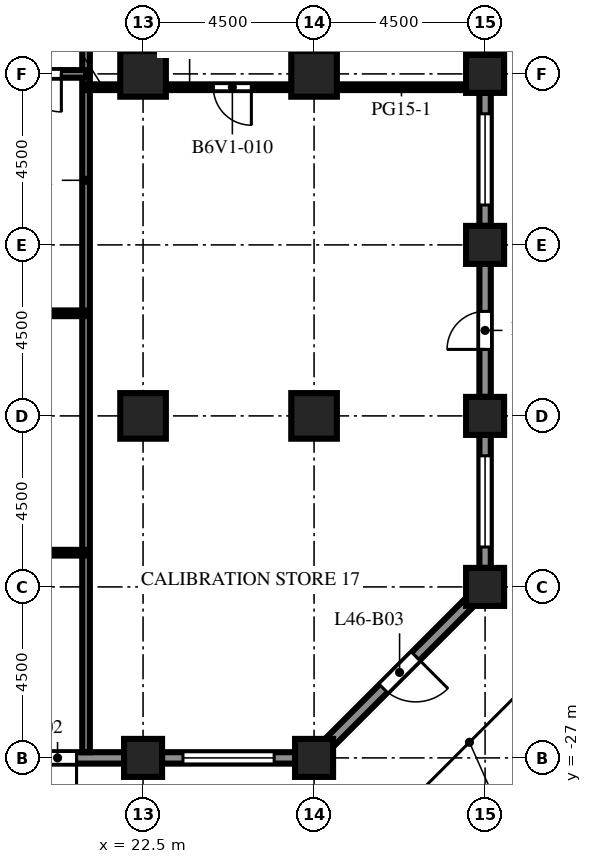
"""IFC4 building model, lengths in metres.
Left out: names, types, materials, properties, quantities, classifications, styles, units other than length and angle.
Written with IfcOpenShell. Run it as: python <this file> out.ifc"""

import sys

from ifc_helpers import new_model, si_unit, direction, frame, frame_2d, origin, origin_2d, place, context, subcontext, project, spatial, rectangle, extrude, element, fill, save


model = new_model("IFC4")
c1 = context("Model", 3, precision=1e-05, world=origin(), true_north=direction((0.0, 1.0)))
c2 = subcontext(c1, "Body", "Model", "MODEL_VIEW")
j1 = project(units=[si_unit("LENGTHUNIT", "METRE"), si_unit("PLANEANGLEUNIT", "RADIAN")], contexts=[c1])
p1 = place(None, origin())
s1 = spatial("IfcSite", under=j1, at=p1, CompositionType="ELEMENT")
p2 = place(p1, origin())
s2 = spatial("IfcBuilding", under=s1, at=p2, CompositionType="ELEMENT")
p3 = place(p2, frame((0.0, 0.0, 203.8)))
s3 = spatial("IfcBuildingStorey", under=s2, at=p3, CompositionType="ELEMENT", Elevation=203.8)
for number, where, z_axis, x_axis in (
    (1, (22.5, -27.0, 0.0), (0.0, 0.0, 1.0), (1.0, 0.0, 0.0)),
    (2, (27.0, -27.0, 0.0), (0.0, 0.0, 1.0), (1.0, 0.0, 0.0)),
    (3, (31.5, -22.5, 0.0), (0.0, 0.0, 1.0), (1.0, 0.0, 0.0)),
    (4, (31.5, -18.0, 0.0), (0.0, 0.0, 1.0), (1.0, 0.0, 0.0)),
    (5, (31.5, -13.5, 0.0), (0.0, 0.0, 1.0), (1.0, 0.0, 0.0)),
    (6, (31.5, -9.0, 0.0), (0.0, 0.0, 1.0), (1.0, 0.0, 0.0)),
):
    element("IfcColumn", number, at=place(p3, frame(where, z_axis=z_axis, x_axis=x_axis)), inside=s3, PredefinedType="COLUMN", context=c2, shape_type="SweptSolid", body=[
        extrude(rectangle(XDim=1.0, YDim=1.0, at=origin_2d()), origin(), (0.0, 0.0, 1.0), 4.1),
    ])
for number, where, z_axis, x_axis in (
    (7, (22.5, -18.0, 0.0), (0.0, 0.0, 1.0), (1.0, 0.0, 0.0)),
    (8, (22.5, -9.0, 0.0), (0.0, 0.0, 1.0), (1.0, 0.0, 0.0)),
    (9, (27.0, -18.0, 0.0), (0.0, 0.0, 1.0), (1.0, 0.0, 0.0)),
    (10, (27.0, -9.0, 0.0), (0.0, 0.0, 1.0), (1.0, 0.0, 0.0)),
):
    element("IfcColumn", number, at=place(p3, frame(where, z_axis=z_axis, x_axis=x_axis)), inside=s3, PredefinedType="COLUMN", context=c2, shape_type="SweptSolid", body=[
        extrude(rectangle(XDim=1.2, YDim=1.2, at=origin_2d()), origin(), (0.0, 0.0, 1.0), 4.1),
    ])
p4 = place(p3, frame((22.0, -27.0, 0.0), z_axis=(0.0, 0.0, 1.0), x_axis=(-1.0, 0.0, 0.0)))
e11 = element("IfcWall", 11, at=p4, inside=s3, PredefinedType="SOLIDWALL", context=c2, shape_type="SweptSolid", body=[
    extrude(rectangle(XDim=3.5, YDim=0.3, at=frame_2d((1.75, 0.0))), origin(), (0.0, 0.0, 1.0), 2.85),
])
p5 = place(p4, frame((1.25, 0.0, 0.0)))
e12 = element("IfcOpeningElement", 12, at=p5, cuts=e11, PredefinedType="OPENING", context=c2, shape_type="SweptSolid", body=[
    extrude(rectangle(XDim=1.0, YDim=2.2, at=frame_2d((0.5, 1.1))), frame((0.0, 0.16, 0.0), z_axis=(0.0, -1.0, 0.0), x_axis=(1.0, 0.0, 0.0)), (0.0, 0.0, 1.0), 0.32),
])
p6 = place(p3, frame((26.5, -27.0, 0.0), z_axis=(0.0, 0.0, 1.0), x_axis=(-1.0, 0.0, 0.0)))
e13 = element("IfcWall", 13, at=p6, inside=s3, PredefinedType="SOLIDWALL", context=c2, shape_type="SweptSolid", body=[
    extrude(rectangle(XDim=3.5, YDim=0.3, at=frame_2d((1.75, 0.0))), origin(), (0.0, 0.0, 1.0), 2.85),
])
p7 = place(p6, frame((0.55, 0.0, 0.8)))
e14 = element("IfcOpeningElement", 14, at=p7, cuts=e13, PredefinedType="OPENING", context=c2, shape_type="SweptSolid", body=[
    extrude(rectangle(XDim=2.4, YDim=1.7, at=frame_2d((1.2, 0.85))), frame((0.0, 0.16, 0.0), z_axis=(0.0, -1.0, 0.0), x_axis=(1.0, 0.0, 0.0)), (0.0, 0.0, 1.0), 0.32),
])
p8 = place(p3, frame((31.106, -22.894, 0.0), z_axis=(0.0, 0.0, 1.0), x_axis=(-0.707106781187, -0.707106781187, 0.0)))
e15 = element("IfcWall", 15, at=p8, inside=s3, PredefinedType="SOLIDWALL", context=c2, shape_type="SweptSolid", body=[
    extrude(rectangle(XDim=5.25, YDim=0.3, at=frame_2d((2.625, 0.0))), origin(), (0.0, 0.0, 1.0), 2.85),
])
p9 = place(p8, frame((2.025, 0.0, 0.0)))
e16 = element("IfcOpeningElement", 16, at=p9, cuts=e15, PredefinedType="OPENING", context=c2, shape_type="SweptSolid", body=[
    extrude(rectangle(XDim=1.2, YDim=2.2, at=frame_2d((0.6, 1.1))), frame((0.0, 0.16, 0.0), z_axis=(0.0, -1.0, 0.0), x_axis=(1.0, 0.0, 0.0)), (0.0, 0.0, 1.0), 0.32),
])
p10 = place(p3, frame((31.5, -18.5, 0.0), z_axis=(0.0, 0.0, 1.0), x_axis=(0.0, -1.0, 0.0)))
e17 = element("IfcWall", 17, at=p10, inside=s3, PredefinedType="SOLIDWALL", context=c2, shape_type="SweptSolid", body=[
    extrude(rectangle(XDim=3.5, YDim=0.3, at=frame_2d((1.75, 0.0))), origin(), (0.0, 0.0, 1.0), 2.85),
])
p11 = place(p10, frame((0.55, 0.0, 0.8)))
e18 = element("IfcOpeningElement", 18, at=p11, cuts=e17, PredefinedType="OPENING", context=c2, shape_type="SweptSolid", body=[
    extrude(rectangle(XDim=2.4, YDim=1.7, at=frame_2d((1.2, 0.85))), frame((0.0, 0.16, 0.0), z_axis=(0.0, -1.0, 0.0), x_axis=(1.0, 0.0, 0.0)), (0.0, 0.0, 1.0), 0.32),
])
p12 = place(p3, frame((31.5, -14.0, 0.0), z_axis=(0.0, 0.0, 1.0), x_axis=(0.0, -1.0, 0.0)))
e19 = element("IfcWall", 19, at=p12, inside=s3, PredefinedType="SOLIDWALL", context=c2, shape_type="SweptSolid", body=[
    extrude(rectangle(XDim=3.5, YDim=0.3, at=frame_2d((1.75, 0.0))), origin(), (0.0, 0.0, 1.0), 2.85),
])
p13 = place(p12, frame((1.25, 0.0, 0.0)))
e20 = element("IfcOpeningElement", 20, at=p13, cuts=e19, PredefinedType="OPENING", context=c2, shape_type="SweptSolid", body=[
    extrude(rectangle(XDim=1.0, YDim=2.2, at=frame_2d((0.5, 1.1))), frame((0.0, 0.16, 0.0), z_axis=(0.0, -1.0, 0.0), x_axis=(1.0, 0.0, 0.0)), (0.0, 0.0, 1.0), 0.32),
])
p14 = place(p3, frame((31.5, -9.5, 0.0), z_axis=(0.0, 0.0, 1.0), x_axis=(0.0, -1.0, 0.0)))
e21 = element("IfcWall", 21, at=p14, inside=s3, PredefinedType="SOLIDWALL", context=c2, shape_type="SweptSolid", body=[
    extrude(rectangle(XDim=3.5, YDim=0.3, at=frame_2d((1.75, 0.0))), origin(), (0.0, 0.0, 1.0), 2.85),
])
p15 = place(p14, frame((0.55, 0.0, 0.8)))
e22 = element("IfcOpeningElement", 22, at=p15, cuts=e21, PredefinedType="OPENING", context=c2, shape_type="SweptSolid", body=[
    extrude(rectangle(XDim=2.4, YDim=1.7, at=frame_2d((1.2, 0.85))), frame((0.0, 0.16, 0.0), z_axis=(0.0, -1.0, 0.0), x_axis=(1.0, 0.0, 0.0)), (0.0, 0.0, 1.0), 0.32),
])
p16 = place(p3, frame((31.5, -5.0, 0.0), z_axis=(0.0, 0.0, 1.0), x_axis=(0.0, -1.0, 0.0)))
e23 = element("IfcWall", 23, at=p16, inside=s3, PredefinedType="SOLIDWALL", context=c2, shape_type="SweptSolid", body=[
    extrude(rectangle(XDim=3.5, YDim=0.3, at=frame_2d((1.75, 0.0))), origin(), (0.0, 0.0, 1.0), 2.85),
])
p17 = place(p16, frame((0.55, 0.0, 0.8)))
e24 = element("IfcOpeningElement", 24, at=p17, cuts=e23, PredefinedType="OPENING", context=c2, shape_type="SweptSolid", body=[
    extrude(rectangle(XDim=2.4, YDim=1.7, at=frame_2d((1.2, 0.85))), frame((0.0, 0.16, 0.0), z_axis=(0.0, -1.0, 0.0), x_axis=(1.0, 0.0, 0.0)), (0.0, 0.0, 1.0), 0.32),
])
p18 = place(p3, frame((21.0, -26.85, 0.0), z_axis=(0.0, 0.0, 1.0), x_axis=(0.0, 1.0, 0.0)))
e25 = element("IfcWall", 25, at=p18, inside=s3, PredefinedType="PARTITIONING", context=c2, shape_type="SweptSolid", body=[
    extrude(rectangle(XDim=30.1, YDim=0.2, at=frame_2d((15.05, 0.0))), origin(), (0.0, 0.0, 1.0), 3.65),
])
p19 = place(p3, frame((21.0, -21.6, 0.0), z_axis=(0.0, 0.0, 1.0), x_axis=(-1.0, 0.0, 0.0)))
e26 = element("IfcWall", 26, at=p19, inside=s3, PredefinedType="PARTITIONING", context=c2, shape_type="SweptSolid", body=[
    extrude(rectangle(XDim=34.5, YDim=0.15, at=frame_2d((17.25, 0.0))), origin(), (0.0, 0.0, 1.0), 3.65),
])
p20 = place(p19, frame((29.9, 0.0, 0.0)))
e27 = element("IfcOpeningElement", 27, at=p20, cuts=e26, PredefinedType="OPENING", context=c2, shape_type="SweptSolid", body=[
    extrude(rectangle(XDim=1.0, YDim=2.1, at=frame_2d((0.5, 1.05))), frame((0.0, 0.085, 0.0), z_axis=(0.0, -1.0, 0.0), x_axis=(1.0, 0.0, 0.0)), (0.0, 0.0, 1.0), 0.17),
])
p21 = place(p19, frame((21.4, 0.0, 0.0)))
e28 = element("IfcOpeningElement", 28, at=p21, cuts=e26, PredefinedType="OPENING", context=c2, shape_type="SweptSolid", body=[
    extrude(rectangle(XDim=1.0, YDim=2.1, at=frame_2d((0.5, 1.05))), frame((0.0, 0.085, 0.0), z_axis=(0.0, -1.0, 0.0), x_axis=(1.0, 0.0, 0.0)), (0.0, 0.0, 1.0), 0.17),
])
p22 = place(p19, frame((13.15, 0.0, 0.0)))
e29 = element("IfcOpeningElement", 29, at=p22, cuts=e26, PredefinedType="OPENING", context=c2, shape_type="SweptSolid", body=[
    extrude(rectangle(XDim=1.0, YDim=2.1, at=frame_2d((0.5, 1.05))), frame((0.0, 0.085, 0.0), z_axis=(0.0, -1.0, 0.0), x_axis=(1.0, 0.0, 0.0)), (0.0, 0.0, 1.0), 0.17),
])
p23 = place(p19, frame((5.15, 0.0, 0.0)))
e30 = element("IfcOpeningElement", 30, at=p23, cuts=e26, PredefinedType="OPENING", context=c2, shape_type="SweptSolid", body=[
    extrude(rectangle(XDim=1.0, YDim=2.1, at=frame_2d((0.5, 1.05))), frame((0.0, 0.085, 0.0), z_axis=(0.0, -1.0, 0.0), x_axis=(1.0, 0.0, 0.0)), (0.0, 0.0, 1.0), 0.17),
])
p24 = place(p3, frame((21.0, -15.3, 0.0), z_axis=(0.0, 0.0, 1.0), x_axis=(-1.0, 0.0, 0.0)))
e31 = element("IfcWall", 31, at=p24, inside=s3, PredefinedType="PARTITIONING", context=c2, shape_type="SweptSolid", body=[
    extrude(rectangle(XDim=34.5, YDim=0.15, at=frame_2d((17.25, 0.0))), origin(), (0.0, 0.0, 1.0), 3.65),
])
p25 = place(p24, frame((28.9, 0.0, 0.0)))
e32 = element("IfcOpeningElement", 32, at=p25, cuts=e31, PredefinedType="OPENING", context=c2, shape_type="SweptSolid", body=[
    extrude(rectangle(XDim=1.0, YDim=2.1, at=frame_2d((0.5, 1.05))), frame((0.0, 0.085, 0.0), z_axis=(0.0, -1.0, 0.0), x_axis=(1.0, 0.0, 0.0)), (0.0, 0.0, 1.0), 0.17),
])
p26 = place(p24, frame((19.4, 0.0, 0.0)))
e33 = element("IfcOpeningElement", 33, at=p26, cuts=e31, PredefinedType="OPENING", context=c2, shape_type="SweptSolid", body=[
    extrude(rectangle(XDim=1.0, YDim=2.1, at=frame_2d((0.5, 1.05))), frame((0.0, 0.085, 0.0), z_axis=(0.0, -1.0, 0.0), x_axis=(1.0, 0.0, 0.0)), (0.0, 0.0, 1.0), 0.17),
])
p27 = place(p24, frame((14.15, 0.0, 0.0)))
e34 = element("IfcOpeningElement", 34, at=p27, cuts=e31, PredefinedType="OPENING", context=c2, shape_type="SweptSolid", body=[
    extrude(rectangle(XDim=1.0, YDim=2.1, at=frame_2d((0.5, 1.05))), frame((0.0, 0.085, 0.0), z_axis=(0.0, -1.0, 0.0), x_axis=(1.0, 0.0, 0.0)), (0.0, 0.0, 1.0), 0.17),
])
p28 = place(p24, frame((3.9, 0.0, 0.0)))
e35 = element("IfcOpeningElement", 35, at=p28, cuts=e31, PredefinedType="OPENING", context=c2, shape_type="SweptSolid", body=[
    extrude(rectangle(XDim=1.0, YDim=2.1, at=frame_2d((0.5, 1.05))), frame((0.0, 0.085, 0.0), z_axis=(0.0, -1.0, 0.0), x_axis=(1.0, 0.0, 0.0)), (0.0, 0.0, 1.0), 0.17),
])
p29 = place(p3, frame((21.0, -9.35, 0.0), z_axis=(0.0, 0.0, 1.0), x_axis=(1.0, 0.0, 0.0)))
e36 = element("IfcWall", 36, at=p29, inside=s3, PredefinedType="PARTITIONING", context=c2, shape_type="SweptSolid", body=[
    extrude(rectangle(XDim=0.9, YDim=0.15, at=frame_2d((0.45, 0.0))), origin(), (0.0, 0.0, 1.0), 3.65),
])
p30 = place(p3, frame((26.4, -9.35, 0.0), z_axis=(0.0, 0.0, 1.0), x_axis=(-1.0, 0.0, 0.0)))
e37 = element("IfcWall", 37, at=p30, inside=s3, PredefinedType="PARTITIONING", context=c2, shape_type="SweptSolid", body=[
    extrude(rectangle(XDim=3.3, YDim=0.15, at=frame_2d((1.65, 0.0))), origin(), (0.0, 0.0, 1.0), 3.65),
])
p31 = place(p30, frame((1.05, 0.0, 0.0)))
e38 = element("IfcOpeningElement", 38, at=p31, cuts=e37, PredefinedType="OPENING", context=c2, shape_type="SweptSolid", body=[
    extrude(rectangle(XDim=1.0, YDim=2.1, at=frame_2d((0.5, 1.05))), frame((0.0, 0.085, 0.0), z_axis=(0.0, -1.0, 0.0), x_axis=(1.0, 0.0, 0.0)), (0.0, 0.0, 1.0), 0.17),
])
p32 = place(p3, frame((27.6, -9.35, 0.0), z_axis=(0.0, 0.0, 1.0), x_axis=(1.0, 0.0, 0.0)))
e39 = element("IfcWall", 39, at=p32, inside=s3, PredefinedType="PARTITIONING", context=c2, shape_type="SweptSolid", body=[
    extrude(rectangle(XDim=3.4, YDim=0.15, at=frame_2d((1.7, 0.0))), origin(), (0.0, 0.0, 1.0), 3.65),
])
p33 = place(p3, frame((21.0, -9.0, 0.0), z_axis=(0.0, 0.0, 1.0), x_axis=(-1.0, 0.0, 0.0)))
e40 = element("IfcWall", 40, at=p33, inside=s3, PredefinedType="PARTITIONING", context=c2, shape_type="SweptSolid", body=[
    extrude(rectangle(XDim=3.0, YDim=0.2, at=frame_2d((1.5, 0.0))), origin(), (0.0, 0.0, 1.0), 3.65),
])
p34 = place(p33, frame((0.65, 0.0, 0.0)))
e41 = element("IfcOpeningElement", 41, at=p34, cuts=e40, PredefinedType="OPENING", context=c2, shape_type="SweptSolid", body=[
    extrude(rectangle(XDim=1.0, YDim=2.1, at=frame_2d((0.5, 1.05))), frame((0.0, 0.11, 0.0), z_axis=(0.0, -1.0, 0.0), x_axis=(1.0, 0.0, 0.0)), (0.0, 0.0, 1.0), 0.22),
])
p35 = place(p5, origin())
e42 = element("IfcDoor", 42, at=p35, inside=s3, OperationType="SINGLE_SWING_LEFT", PredefinedType="DOOR", context=c2, shape_type="SweptSolid", body=[
    extrude(rectangle(XDim=1.0, YDim=2.2, at=frame_2d((0.5, 1.1))), frame((0.0, 0.025, 0.0), z_axis=(0.0, -1.0, 0.0), x_axis=(1.0, 0.0, 0.0)), (0.0, 0.0, 1.0), 0.05),
])
fill(e12, e42)
p36 = place(p7, origin())
e43 = element("IfcWindow", 43, at=p36, inside=s3, PartitioningType="SINGLE_PANEL", PredefinedType="WINDOW", context=c2, shape_type="SweptSolid", body=[
    extrude(rectangle(XDim=2.4, YDim=1.7, at=frame_2d((1.2, 0.85))), frame((0.0, 0.03, 0.0), z_axis=(0.0, -1.0, 0.0), x_axis=(1.0, 0.0, 0.0)), (0.0, 0.0, 1.0), 0.06),
])
fill(e14, e43)
p37 = place(p9, origin())
e44 = element("IfcDoor", 44, at=p37, inside=s3, OperationType="SINGLE_SWING_LEFT", PredefinedType="DOOR", context=c2, shape_type="SweptSolid", body=[
    extrude(rectangle(XDim=1.2, YDim=2.2, at=frame_2d((0.6, 1.1))), frame((0.0, 0.025, 0.0), z_axis=(0.0, -1.0, 0.0), x_axis=(1.0, 0.0, 0.0)), (0.0, 0.0, 1.0), 0.05),
])
fill(e16, e44)
p38 = place(p11, origin())
e45 = element("IfcWindow", 45, at=p38, inside=s3, PartitioningType="SINGLE_PANEL", PredefinedType="WINDOW", context=c2, shape_type="SweptSolid", body=[
    extrude(rectangle(XDim=2.4, YDim=1.7, at=frame_2d((1.2, 0.85))), frame((0.0, 0.03, 0.0), z_axis=(0.0, -1.0, 0.0), x_axis=(1.0, 0.0, 0.0)), (0.0, 0.0, 1.0), 0.06),
])
fill(e18, e45)
p39 = place(p13, origin())
e46 = element("IfcDoor", 46, at=p39, inside=s3, OperationType="SINGLE_SWING_RIGHT", PredefinedType="DOOR", context=c2, shape_type="SweptSolid", body=[
    extrude(rectangle(XDim=1.0, YDim=2.2, at=frame_2d((0.5, 1.1))), frame((0.0, 0.025, 0.0), z_axis=(0.0, -1.0, 0.0), x_axis=(1.0, 0.0, 0.0)), (0.0, 0.0, 1.0), 0.05),
])
fill(e20, e46)
p40 = place(p15, origin())
e47 = element("IfcWindow", 47, at=p40, inside=s3, PartitioningType="SINGLE_PANEL", PredefinedType="WINDOW", context=c2, shape_type="SweptSolid", body=[
    extrude(rectangle(XDim=2.4, YDim=1.7, at=frame_2d((1.2, 0.85))), frame((0.0, 0.03, 0.0), z_axis=(0.0, -1.0, 0.0), x_axis=(1.0, 0.0, 0.0)), (0.0, 0.0, 1.0), 0.06),
])
fill(e22, e47)
p41 = place(p31, origin())
e48 = element("IfcDoor", 48, at=p41, inside=s3, OperationType="SINGLE_SWING_LEFT", PredefinedType="DOOR", context=c2, shape_type="SweptSolid", body=[
    extrude(rectangle(XDim=1.0, YDim=2.1, at=frame_2d((0.5, 1.05))), frame((0.0, 0.025, 0.0), z_axis=(0.0, -1.0, 0.0), x_axis=(1.0, 0.0, 0.0)), (0.0, 0.0, 1.0), 0.05),
])
fill(e38, e48)
p42 = place(p34, origin())
e49 = element("IfcDoor", 49, at=p42, inside=s3, OperationType="SINGLE_SWING_LEFT", PredefinedType="DOOR", context=c2, shape_type="SweptSolid", body=[
    extrude(rectangle(XDim=1.0, YDim=2.1, at=frame_2d((0.5, 1.05))), frame((0.0, 0.025, 0.0), z_axis=(0.0, -1.0, 0.0), x_axis=(1.0, 0.0, 0.0)), (0.0, 0.0, 1.0), 0.05),
])
fill(e41, e49)
save(model, sys.argv[1])
